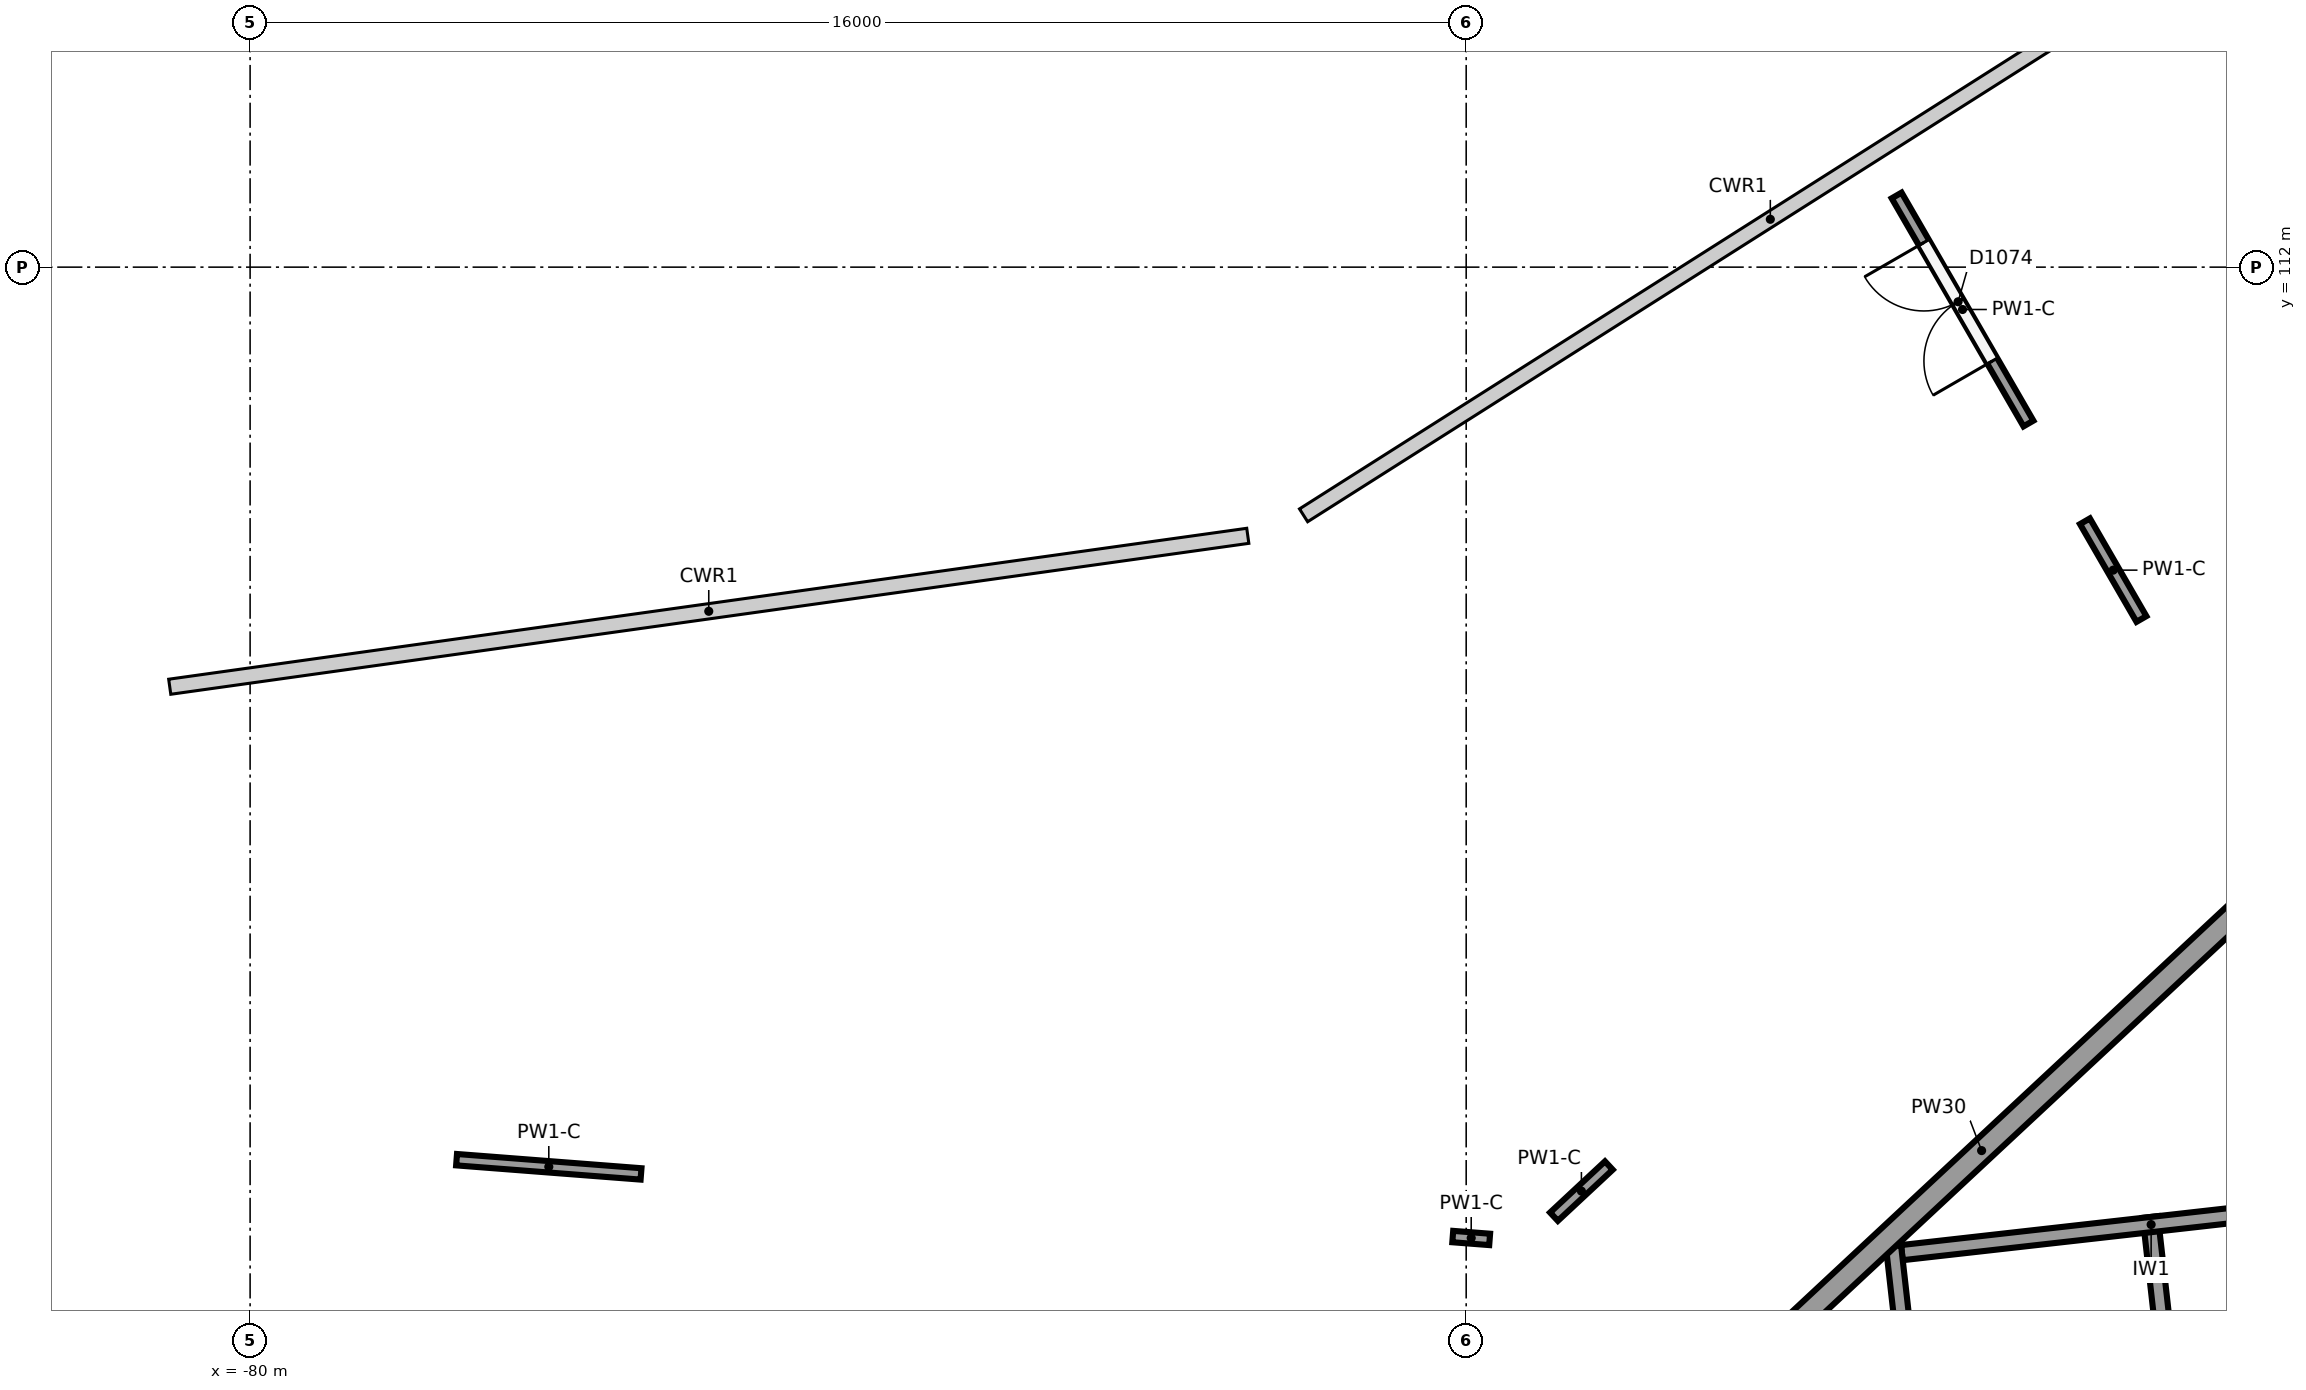
"""IFC4 building model, lengths in metres.
Left out: names, types, materials, properties, quantities, classifications, styles, units other than length and angle.
Written with IfcOpenShell. Run it as: python <this file> out.ifc"""

import sys

from ifc_helpers import new_model, si_unit, direction, frame, frame_2d, origin, origin_2d, place, context, subcontext, project, spatial, rectangle, circle, extrude, element, fill, save


model = new_model("IFC4")
c1 = context("Model", 3, precision=1e-05, world=origin(), true_north=direction((0.0, 1.0)))
c2 = subcontext(c1, "Body", "Model", "MODEL_VIEW")
j1 = project(units=[si_unit("LENGTHUNIT", "METRE"), si_unit("PLANEANGLEUNIT", "RADIAN")], contexts=[c1])
p1 = place(None, origin())
s1 = spatial("IfcSite", under=j1, at=p1, CompositionType="ELEMENT")
p2 = place(p1, origin())
s2 = spatial("IfcBuilding", under=s1, at=p2, CompositionType="ELEMENT")
p3 = place(p2, frame((0.0, 0.0, 12.0)))
s3 = spatial("IfcBuildingStorey", under=s2, at=p3, CompositionType="ELEMENT", Elevation=12.0)
for number, where, z_axis, x_axis in (
    (1, (-63.373, 99.648, 0.0), (0.0, 0.0, 1.0), (1.0, 0.0, 0.0)),
    (2, (-64.694, 103.424, 0.0), (0.0, 0.0, 1.0), (1.0, 0.0, 0.0)),
    (3, (-66.477, 108.521, 0.0), (0.0, 0.0, 1.0), (1.0, 0.0, 0.0)),
    (4, (-77.187, 99.634, 0.0), (0.0, 0.0, 1.0), (1.0, 0.0, 0.0)),
    (5, (-78.581, 101.852, 0.0), (0.0, 0.0, 1.0), (1.0, 0.0, 0.0)),
    (6, (-81.454, 106.424, 0.0), (0.0, 0.0, 1.0), (1.0, 0.0, 0.0)),
):
    element("IfcColumn", number, at=place(p3, frame(where, z_axis=z_axis, x_axis=x_axis)), inside=s3, PredefinedType="COLUMN", context=c2, shape_type="SweptSolid", body=[
        extrude(circle(Radius=0.4, at=origin_2d()), origin(), (0.0, 0.0, 1.0), 6.0),
    ])
p4 = place(p3, frame((-61.723, 96.179, 0.0), z_axis=(0.0, 0.0, 1.0), x_axis=(0.731540985517, 0.681797467368, 0.0)))
e7 = element("IfcWall", 7, at=p4, inside=s3, PredefinedType="SOLIDWALL", context=c2, shape_type="SweptSolid", body=[
    extrude(rectangle(XDim=12.314, YDim=0.3, at=frame_2d((6.157, 0.0))), origin(), (0.0, 0.0, 1.0), 4.35),
])
p5 = place(p3, frame((-58.378, 99.123, 0.0), z_axis=(0.0, 0.0, 1.0), x_axis=(0.111982724367, -0.993710153638, 0.0)))
e8 = element("IfcWall", 8, at=p5, inside=s3, PredefinedType="SHEAR", context=c2, shape_type="SweptSolid", body=[
    extrude(rectangle(XDim=7.6, YDim=0.2, at=frame_2d((3.8, 0.0))), origin(), (0.0, 0.0, 1.0), 5.65),
])
p6 = place(p3, frame((-51.709, 99.774, 0.0), z_axis=(0.0, 0.0, 1.0), x_axis=(-0.993715690617, -0.111933579504, 0.0)))
e9 = element("IfcWall", 9, at=p6, inside=s3, PredefinedType="SHEAR", context=c2, shape_type="SweptSolid", body=[
    extrude(rectangle(XDim=6.6, YDim=0.2, at=frame_2d((3.3, 0.0))), origin(), (0.0, 0.0, 1.0), 5.65),
])
p7 = place(p3, frame((-54.999, 99.504, 0.0), z_axis=(0.0, 0.0, 1.0), x_axis=(0.111982724367, -0.993710153638, 0.0)))
e10 = element("IfcWall", 10, at=p7, inside=s3, PredefinedType="SHEAR", context=c2, shape_type="SweptSolid", body=[
    extrude(rectangle(XDim=7.6, YDim=0.2, at=frame_2d((3.8, 0.0))), origin(), (0.0, 0.0, 1.0), 5.65),
])
p8 = place(p3, frame((-55.115, 107.371, 0.0), z_axis=(0.0, 0.0, 1.0), x_axis=(-0.500504874148, 0.865733718272, 0.0)))
e11 = element("IfcWall", 11, at=p8, inside=s3, PredefinedType="PARTITIONING", context=c2, shape_type="SweptSolid", body=[
    extrude(rectangle(XDim=1.485, YDim=0.15, at=frame_2d((0.743, 0.0))), origin(), (0.0, 0.0, 1.0), 5.55),
])
p9 = place(p3, frame((-56.602, 109.943, 0.0), z_axis=(0.0, 0.0, 1.0), x_axis=(-0.500389094417, 0.865800643444, 0.0)))
e12 = element("IfcWall", 12, at=p9, inside=s3, PredefinedType="PARTITIONING", context=c2, shape_type="SweptSolid", body=[
    extrude(rectangle(XDim=3.466, YDim=0.15, at=frame_2d((1.733, 0.0))), origin(), (0.0, 0.0, 1.0), 5.55),
])
p10 = place(p9, frame((0.95, 0.0, 0.0)))
e13 = element("IfcOpeningElement", 13, at=p10, cuts=e12, PredefinedType="OPENING", context=c2, shape_type="SweptSolid", body=[
    extrude(rectangle(XDim=1.8, YDim=2.1, at=frame_2d((0.9, 1.05))), frame((0.0, 0.085, 0.0), z_axis=(0.0, -1.0, 0.0), x_axis=(1.0, 0.0, 0.0)), (0.0, 0.0, 1.0), 0.17),
])
p11 = place(p3, frame((-62.123, 100.18, 0.0), z_axis=(0.0, 0.0, 1.0), x_axis=(-0.731655638736, -0.681674428379, 0.0)))
e14 = element("IfcWall", 14, at=p11, inside=s3, PredefinedType="PARTITIONING", context=c2, shape_type="SweptSolid", body=[
    extrude(rectangle(XDim=0.987, YDim=0.15, at=frame_2d((0.493, 0.0))), origin(), (0.0, 0.0, 1.0), 5.55),
])
p12 = place(p3, frame((-63.691, 99.209, 0.0), z_axis=(0.0, 0.0, 1.0), x_axis=(-0.997054485502, 0.076696498885, 0.0)))
e15 = element("IfcWall", 15, at=p12, inside=s3, PredefinedType="PARTITIONING", context=c2, shape_type="SweptSolid", body=[
    extrude(rectangle(XDim=0.487, YDim=0.15, at=frame_2d((0.244, 0.0))), origin(), (0.0, 0.0, 1.0), 5.55),
])
p13 = place(p3, frame((-74.856, 100.07, 0.0), z_axis=(0.0, 0.0, 1.0), x_axis=(-0.99703735319, 0.076918894578, 0.0)))
e16 = element("IfcWall", 16, at=p13, inside=s3, PredefinedType="PARTITIONING", context=c2, shape_type="SweptSolid", body=[
    extrude(rectangle(XDim=2.435, YDim=0.15, at=frame_2d((1.217, 0.0))), origin(), (0.0, 0.0, 1.0), 5.55),
])
p14 = place(p10, origin())
e17 = element("IfcDoor", 17, at=p14, inside=s3, OperationType="DOUBLE_DOOR_SINGLE_SWING", PredefinedType="DOOR", context=c2, shape_type="SweptSolid", body=[
    extrude(rectangle(XDim=1.8, YDim=2.1, at=frame_2d((0.9, 1.05))), frame((0.0, 0.025, 0.0), z_axis=(0.0, -1.0, 0.0), x_axis=(1.0, 0.0, 0.0)), (0.0, 0.0, 1.0), 0.05),
])
fill(e13, e17)
save(model, sys.argv[1])
